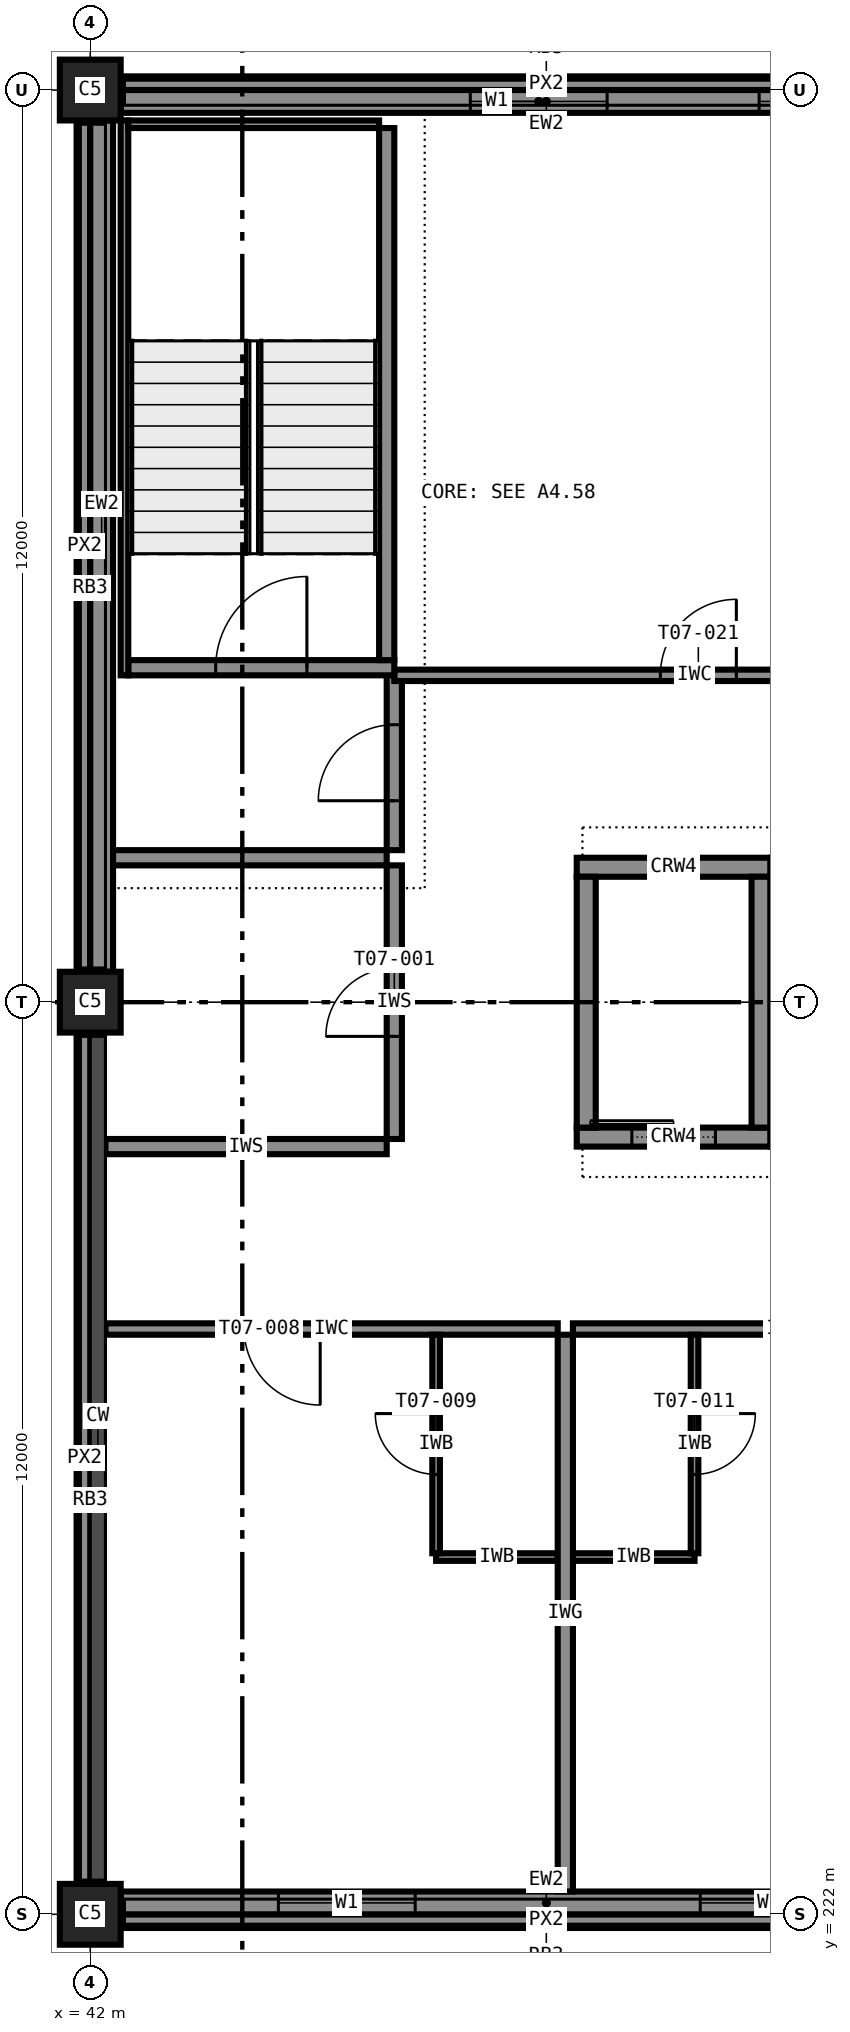
"""IFC4 building model, lengths in metres.
Left out: names, types, materials, properties, quantities, classifications, styles, units other than length and angle.
Written with IfcOpenShell. Run it as: python <this file> out.ifc"""

import sys

from ifc_helpers import new_model, si_unit, direction, frame, frame_2d, origin, origin_2d, place, context, subcontext, project, spatial, rectangle, extrude, element, fill, save


model = new_model("IFC4")
c1 = context("Model", 3, precision=1e-05, world=origin(), true_north=direction((0.0, 1.0)))
c2 = subcontext(c1, "Body", "Model", "MODEL_VIEW")
j1 = project(units=[si_unit("LENGTHUNIT", "METRE"), si_unit("PLANEANGLEUNIT", "RADIAN")], contexts=[c1])
p1 = place(None, origin())
s1 = spatial("IfcSite", under=j1, at=p1, CompositionType="ELEMENT")
p2 = place(p1, origin())
s2 = spatial("IfcBuilding", under=s1, at=p2, CompositionType="ELEMENT")
p3 = place(p2, frame((0.0, 0.0, 35.4)))
s3 = spatial("IfcBuildingStorey", under=s2, at=p3, CompositionType="ELEMENT", Elevation=35.4)
for number, where, z_axis, x_axis in (
    (1, (42.0, 222.0, 0.0), (0.0, 0.0, 1.0), (1.0, 0.0, 0.0)),
    (2, (42.0, 234.0, 0.0), (0.0, 0.0, 1.0), (1.0, 0.0, 0.0)),
    (3, (42.0, 246.0, 0.0), (0.0, 0.0, 1.0), (1.0, 0.0, 0.0)),
):
    element("IfcColumn", number, at=place(p3, frame(where, z_axis=z_axis, x_axis=x_axis)), inside=s3, PredefinedType="COLUMN", context=c2, shape_type="SweptSolid", body=[
        extrude(rectangle(XDim=0.8, YDim=0.8, at=origin_2d()), origin(), (0.0, 0.0, 1.0), 3.6),
    ])
p4 = place(p3, frame((48.4, 232.225, 0.0), z_axis=(0.0, 0.0, 1.0), x_axis=(1.0, 0.0, 0.0)))
e4 = element("IfcWall", 4, at=p4, inside=s3, PredefinedType="SHEAR", context=c2, shape_type="SweptSolid", body=[
    extrude(rectangle(XDim=2.55, YDim=0.25, at=frame_2d((1.275, 0.0))), origin(), (0.0, 0.0, 1.0), 3.6),
])
p5 = place(p4, frame((0.725, 0.0, 0.0)))
e5 = element("IfcOpeningElement", 5, at=p5, cuts=e4, PredefinedType="OPENING", context=c2, shape_type="SweptSolid", body=[
    extrude(rectangle(XDim=1.1, YDim=2.1, at=frame_2d((0.55, 1.05))), frame((0.0, 0.135, 0.0), z_axis=(0.0, -1.0, 0.0), x_axis=(1.0, 0.0, 0.0)), (0.0, 0.0, 1.0), 0.27),
])
p6 = place(p3, frame((48.4, 235.775, 0.0), z_axis=(0.0, 0.0, 1.0), x_axis=(1.0, 0.0, 0.0)))
e6 = element("IfcWall", 6, at=p6, inside=s3, PredefinedType="SHEAR", context=c2, shape_type="SweptSolid", body=[
    extrude(rectangle(XDim=2.55, YDim=0.25, at=frame_2d((1.275, 0.0))), origin(), (0.0, 0.0, 1.0), 3.6),
])
for number, where, z_axis, x_axis in (
    (7, (48.525, 232.35, 0.0), (0.0, 0.0, 1.0), (0.0, 1.0, 0.0)),
    (8, (50.825, 232.35, 0.0), (0.0, 0.0, 1.0), (0.0, 1.0, 0.0)),
):
    element("IfcWall", number, at=place(p3, frame(where, z_axis=z_axis, x_axis=x_axis)), inside=s3, PredefinedType="SHEAR", context=c2, shape_type="SweptSolid", body=[
        extrude(rectangle(XDim=3.3, YDim=0.25, at=frame_2d((1.65, 0.0))), origin(), (0.0, 0.0, 1.0), 3.6),
    ])
p7 = place(p3, frame((50.95, 232.225, 0.0), z_axis=(0.0, 0.0, 1.0), x_axis=(1.0, 0.0, 0.0)))
e9 = element("IfcWall", 9, at=p7, inside=s3, PredefinedType="SHEAR", context=c2, shape_type="SweptSolid", body=[
    extrude(rectangle(XDim=2.55, YDim=0.25, at=frame_2d((1.275, 0.0))), origin(), (0.0, 0.0, 1.0), 3.6),
])
p8 = place(p7, frame((0.725, 0.0, 0.0)))
e10 = element("IfcOpeningElement", 10, at=p8, cuts=e9, PredefinedType="OPENING", context=c2, shape_type="SweptSolid", body=[
    extrude(rectangle(XDim=1.1, YDim=2.1, at=frame_2d((0.55, 1.05))), frame((0.0, 0.135, 0.0), z_axis=(0.0, -1.0, 0.0), x_axis=(1.0, 0.0, 0.0)), (0.0, 0.0, 1.0), 0.27),
])
p9 = place(p3, frame((50.95, 235.775, 0.0), z_axis=(0.0, 0.0, 1.0), x_axis=(1.0, 0.0, 0.0)))
e11 = element("IfcWall", 11, at=p9, inside=s3, PredefinedType="SHEAR", context=c2, shape_type="SweptSolid", body=[
    extrude(rectangle(XDim=2.55, YDim=0.25, at=frame_2d((1.275, 0.0))), origin(), (0.0, 0.0, 1.0), 3.6),
])
p10 = place(p3, frame((42.5, 238.4, 0.0), z_axis=(0.0, 0.0, 1.0), x_axis=(1.0, 0.0, 0.0)))
e12 = element("IfcWall", 12, at=p10, inside=s3, PredefinedType="SHEAR", context=c2, shape_type="SweptSolid", body=[
    extrude(rectangle(XDim=3.5, YDim=0.2, at=frame_2d((1.75, 0.0))), origin(), (0.0, 0.0, 1.0), 3.6),
])
p11 = place(p10, frame((1.15, 0.0, 0.0)))
e13 = element("IfcOpeningElement", 13, at=p11, cuts=e12, PredefinedType="OPENING", context=c2, shape_type="SweptSolid", body=[
    extrude(rectangle(XDim=1.2, YDim=2.1, at=frame_2d((0.6, 1.05))), frame((0.0, 0.11, 0.0), z_axis=(0.0, -1.0, 0.0), x_axis=(1.0, 0.0, 0.0)), (0.0, 0.0, 1.0), 0.22),
])
p12 = place(p3, frame((45.9, 238.5, 0.0), z_axis=(0.0, 0.0, 1.0), x_axis=(0.0, 1.0, 0.0)))
e14 = element("IfcWall", 14, at=p12, inside=s3, PredefinedType="SHEAR", context=c2, shape_type="SweptSolid", body=[
    extrude(rectangle(XDim=7.0, YDim=0.2, at=frame_2d((3.5, 0.0))), origin(), (0.0, 0.0, 1.0), 3.6),
])
p13 = place(p3, frame((42.45, 238.3, 0.0), z_axis=(0.0, 0.0, 1.0), x_axis=(0.0, 1.0, 0.0)))
e15 = element("IfcWall", 15, at=p13, inside=s3, PredefinedType="SHEAR", context=c2, shape_type="SweptSolid", body=[
    extrude(rectangle(XDim=7.3, YDim=0.1, at=frame_2d((3.65, 0.0))), origin(), (0.0, 0.0, 1.0), 3.4),
])
p14 = place(p3, frame((42.5, 245.55, 0.0), z_axis=(0.0, 0.0, 1.0), x_axis=(1.0, 0.0, 0.0)))
e16 = element("IfcWall", 16, at=p14, inside=s3, PredefinedType="SHEAR", context=c2, shape_type="SweptSolid", body=[
    extrude(rectangle(XDim=3.3, YDim=0.1, at=frame_2d((1.65, 0.0))), origin(), (0.0, 0.0, 1.0), 3.4),
])
p15 = place(p3, frame((42.4, 222.15, 0.0), z_axis=(0.0, 0.0, 1.0), x_axis=(1.0, 0.0, 0.0)))
e17 = element("IfcWall", 17, at=p15, inside=s3, PredefinedType="STANDARD", context=c2, shape_type="SweptSolid", body=[
    extrude(rectangle(XDim=11.2, YDim=0.3, at=frame_2d((5.6, 0.0))), origin(), (0.0, 0.0, 1.0), 2.6),
])
p16 = place(p15, frame((2.075, 0.0, 0.85)))
e18 = element("IfcOpeningElement", 18, at=p16, cuts=e17, PredefinedType="OPENING", context=c2, shape_type="SweptSolid", body=[
    extrude(rectangle(XDim=1.8, YDim=1.75, at=frame_2d((0.9, 0.875))), frame((0.0, 0.16, 0.0), z_axis=(0.0, -1.0, 0.0), x_axis=(1.0, 0.0, 0.0)), (0.0, 0.0, 1.0), 0.32),
])
p17 = place(p15, frame((7.625, 0.0, 0.85)))
e19 = element("IfcOpeningElement", 19, at=p17, cuts=e17, PredefinedType="OPENING", context=c2, shape_type="SweptSolid", body=[
    extrude(rectangle(XDim=1.8, YDim=1.75, at=frame_2d((0.9, 0.875))), frame((0.0, 0.16, 0.0), z_axis=(0.0, -1.0, 0.0), x_axis=(1.0, 0.0, 0.0)), (0.0, 0.0, 1.0), 0.32),
])
p18 = place(p3, frame((42.4, 221.925, 3.4), z_axis=(0.0, 0.0, 1.0), x_axis=(1.0, 0.0, 0.0)))
e20 = element("IfcWall", 20, at=p18, inside=s3, PredefinedType="STANDARD", context=c2, shape_type="SweptSolid", body=[
    extrude(rectangle(XDim=11.2, YDim=0.15, at=frame_2d((5.6, 0.0))), origin(), (0.0, 0.0, 1.0), 0.2),
])
p19 = place(p3, frame((53.6, 245.85, 0.0), z_axis=(0.0, 0.0, 1.0), x_axis=(-1.0, 0.0, 0.0)))
e21 = element("IfcWall", 21, at=p19, inside=s3, PredefinedType="STANDARD", context=c2, shape_type="SweptSolid", body=[
    extrude(rectangle(XDim=11.2, YDim=0.3, at=frame_2d((5.6, 0.0))), origin(), (0.0, 0.0, 1.0), 2.6),
])
p20 = place(p19, frame((1.0, 0.0, 0.85)))
e22 = element("IfcOpeningElement", 22, at=p20, cuts=e21, PredefinedType="OPENING", context=c2, shape_type="SweptSolid", body=[
    extrude(rectangle(XDim=1.8, YDim=1.75, at=frame_2d((0.9, 0.875))), frame((0.0, 0.16, 0.0), z_axis=(0.0, -1.0, 0.0), x_axis=(1.0, 0.0, 0.0)), (0.0, 0.0, 1.0), 0.32),
])
p21 = place(p19, frame((4.8, 0.0, 0.85)))
e23 = element("IfcOpeningElement", 23, at=p21, cuts=e21, PredefinedType="OPENING", context=c2, shape_type="SweptSolid", body=[
    extrude(rectangle(XDim=1.8, YDim=1.75, at=frame_2d((0.9, 0.875))), frame((0.0, 0.16, 0.0), z_axis=(0.0, -1.0, 0.0), x_axis=(1.0, 0.0, 0.0)), (0.0, 0.0, 1.0), 0.32),
])
p22 = place(p3, frame((53.6, 246.075, 3.4), z_axis=(0.0, 0.0, 1.0), x_axis=(-1.0, 0.0, 0.0)))
e24 = element("IfcWall", 24, at=p22, inside=s3, PredefinedType="STANDARD", context=c2, shape_type="SweptSolid", body=[
    extrude(rectangle(XDim=11.2, YDim=0.15, at=frame_2d((5.6, 0.0))), origin(), (0.0, 0.0, 1.0), 0.2),
])
p23 = place(p3, frame((42.15, 245.6, 0.0), z_axis=(0.0, 0.0, 1.0), x_axis=(0.0, -1.0, 0.0)))
e25 = element("IfcWall", 25, at=p23, inside=s3, PredefinedType="STANDARD", context=c2, shape_type="SweptSolid", body=[
    extrude(rectangle(XDim=11.2, YDim=0.3, at=frame_2d((5.6, 0.0))), origin(), (0.0, 0.0, 1.0), 2.6),
])
for number, where, z_axis, x_axis in (
    (26, (41.925, 245.6, 3.4), (0.0, 0.0, 1.0), (0.0, -1.0, 0.0)),
    (27, (41.925, 233.6, 3.4), (0.0, 0.0, 1.0), (0.0, -1.0, 0.0)),
):
    element("IfcWall", number, at=place(p3, frame(where, z_axis=z_axis, x_axis=x_axis)), inside=s3, PredefinedType="STANDARD", context=c2, shape_type="SweptSolid", body=[
        extrude(rectangle(XDim=11.2, YDim=0.15, at=frame_2d((5.6, 0.0))), origin(), (0.0, 0.0, 1.0), 0.2),
    ])
p24 = place(p3, frame((42.2, 232.1, 0.0), z_axis=(0.0, 0.0, 1.0), x_axis=(1.0, 0.0, 0.0)))
e28 = element("IfcWall", 28, at=p24, inside=s3, PredefinedType="PARTITIONING", context=c2, shape_type="SweptSolid", body=[
    extrude(rectangle(XDim=3.7, YDim=0.2, at=frame_2d((1.85, 0.0))), origin(), (0.0, 0.0, 1.0), 3.4),
])
p25 = place(p3, frame((42.3, 235.9, 0.0), z_axis=(0.0, 0.0, 1.0), x_axis=(1.0, 0.0, 0.0)))
e29 = element("IfcWall", 29, at=p25, inside=s3, PredefinedType="PARTITIONING", context=c2, shape_type="SweptSolid", body=[
    extrude(rectangle(XDim=3.6, YDim=0.2, at=frame_2d((1.8, 0.0))), origin(), (0.0, 0.0, 1.0), 3.4),
])
p26 = place(p3, frame((46.0, 232.2, 0.0), z_axis=(0.0, 0.0, 1.0), x_axis=(0.0, 1.0, 0.0)))
e30 = element("IfcWall", 30, at=p26, inside=s3, PredefinedType="PARTITIONING", context=c2, shape_type="SweptSolid", body=[
    extrude(rectangle(XDim=3.6, YDim=0.2, at=frame_2d((1.8, 0.0))), origin(), (0.0, 0.0, 1.0), 3.4),
])
p27 = place(p26, frame((1.35, 0.0, 0.0)))
e31 = element("IfcOpeningElement", 31, at=p27, cuts=e30, PredefinedType="OPENING", context=c2, shape_type="SweptSolid", body=[
    extrude(rectangle(XDim=0.9, YDim=2.1, at=frame_2d((0.45, 1.05))), frame((0.0, 0.11, 0.0), z_axis=(0.0, -1.0, 0.0), x_axis=(1.0, 0.0, 0.0)), (0.0, 0.0, 1.0), 0.22),
])
p28 = place(p3, frame((46.0, 236.0, 0.0), z_axis=(0.0, 0.0, 1.0), x_axis=(0.0, 1.0, 0.0)))
e32 = element("IfcWall", 32, at=p28, inside=s3, PredefinedType="PARTITIONING", context=c2, shape_type="SweptSolid", body=[
    extrude(rectangle(XDim=2.3, YDim=0.2, at=frame_2d((1.15, 0.0))), origin(), (0.0, 0.0, 1.0), 3.4),
])
p29 = place(p28, frame((0.65, 0.0, 0.0)))
e33 = element("IfcOpeningElement", 33, at=p29, cuts=e32, PredefinedType="OPENING", context=c2, shape_type="SweptSolid", body=[
    extrude(rectangle(XDim=1.0, YDim=2.1, at=frame_2d((0.5, 1.05))), frame((0.0, 0.11, 0.0), z_axis=(0.0, -1.0, 0.0), x_axis=(1.0, 0.0, 0.0)), (0.0, 0.0, 1.0), 0.22),
])
p30 = place(p3, frame((48.15, 229.7, 0.0), z_axis=(0.0, 0.0, 1.0), x_axis=(-1.0, 0.0, 0.0)))
e34 = element("IfcWall", 34, at=p30, inside=s3, PredefinedType="PARTITIONING", context=c2, shape_type="SweptSolid", body=[
    extrude(rectangle(XDim=5.95, YDim=0.15, at=frame_2d((2.975, 0.0))), origin(), (0.0, 0.0, 1.0), 3.4),
])
p31 = place(p30, frame((3.125, 0.0, 0.0)))
e35 = element("IfcOpeningElement", 35, at=p31, cuts=e34, PredefinedType="OPENING", context=c2, shape_type="SweptSolid", body=[
    extrude(rectangle(XDim=1.0, YDim=2.1, at=frame_2d((0.5, 1.05))), frame((0.0, 0.085, 0.0), z_axis=(0.0, -1.0, 0.0), x_axis=(1.0, 0.0, 0.0)), (0.0, 0.0, 1.0), 0.17),
])
p32 = place(p3, frame((46.55, 226.7, 0.0), z_axis=(0.0, 0.0, 1.0), x_axis=(1.0, 0.0, 0.0)))
e36 = element("IfcWall", 36, at=p32, inside=s3, PredefinedType="PARTITIONING", context=c2, shape_type="SweptSolid", body=[
    extrude(rectangle(XDim=1.6, YDim=0.1, at=frame_2d((0.8, 0.0))), origin(), (0.0, 0.0, 1.0), 3.4),
])
p33 = place(p3, frame((46.55, 226.75, 0.0), z_axis=(0.0, 0.0, 1.0), x_axis=(0.0, 1.0, 0.0)))
e37 = element("IfcWall", 37, at=p33, inside=s3, PredefinedType="PARTITIONING", context=c2, shape_type="SweptSolid", body=[
    extrude(rectangle(XDim=2.875, YDim=0.1, at=frame_2d((1.438, 0.0))), origin(), (0.0, 0.0, 1.0), 3.4),
])
p34 = place(p33, frame((1.038, 0.0, 0.0)))
e38 = element("IfcOpeningElement", 38, at=p34, cuts=e37, PredefinedType="OPENING", context=c2, shape_type="SweptSolid", body=[
    extrude(rectangle(XDim=0.8, YDim=2.1, at=frame_2d((0.4, 1.05))), frame((0.0, 0.06, 0.0), z_axis=(0.0, -1.0, 0.0), x_axis=(1.0, 0.0, 0.0)), (0.0, 0.0, 1.0), 0.12),
])
p35 = place(p3, frame((53.9, 229.7, 0.0), z_axis=(0.0, 0.0, 1.0), x_axis=(-1.0, 0.0, 0.0)))
e39 = element("IfcWall", 39, at=p35, inside=s3, PredefinedType="PARTITIONING", context=c2, shape_type="SweptSolid", body=[
    extrude(rectangle(XDim=5.55, YDim=0.15, at=frame_2d((2.775, 0.0))), origin(), (0.0, 0.0, 1.0), 3.4),
])
p36 = place(p35, frame((1.425, 0.0, 0.0)))
e40 = element("IfcOpeningElement", 40, at=p36, cuts=e39, PredefinedType="OPENING", context=c2, shape_type="SweptSolid", body=[
    extrude(rectangle(XDim=1.0, YDim=2.1, at=frame_2d((0.5, 1.05))), frame((0.0, 0.085, 0.0), z_axis=(0.0, -1.0, 0.0), x_axis=(1.0, 0.0, 0.0)), (0.0, 0.0, 1.0), 0.17),
])
p37 = place(p3, frame((48.35, 226.7, 0.0), z_axis=(0.0, 0.0, 1.0), x_axis=(1.0, 0.0, 0.0)))
e41 = element("IfcWall", 41, at=p37, inside=s3, PredefinedType="PARTITIONING", context=c2, shape_type="SweptSolid", body=[
    extrude(rectangle(XDim=1.6, YDim=0.1, at=frame_2d((0.8, 0.0))), origin(), (0.0, 0.0, 1.0), 3.4),
])
p38 = place(p3, frame((49.95, 229.625, 0.0), z_axis=(0.0, 0.0, 1.0), x_axis=(0.0, -1.0, 0.0)))
e42 = element("IfcWall", 42, at=p38, inside=s3, PredefinedType="PARTITIONING", context=c2, shape_type="SweptSolid", body=[
    extrude(rectangle(XDim=2.875, YDim=0.1, at=frame_2d((1.438, 0.0))), origin(), (0.0, 0.0, 1.0), 3.4),
])
p39 = place(p38, frame((1.038, 0.0, 0.0)))
e43 = element("IfcOpeningElement", 43, at=p39, cuts=e42, PredefinedType="OPENING", context=c2, shape_type="SweptSolid", body=[
    extrude(rectangle(XDim=0.8, YDim=2.1, at=frame_2d((0.4, 1.05))), frame((0.0, 0.06, 0.0), z_axis=(0.0, -1.0, 0.0), x_axis=(1.0, 0.0, 0.0)), (0.0, 0.0, 1.0), 0.12),
])
p40 = place(p3, frame((48.25, 222.3, 0.0), z_axis=(0.0, 0.0, 1.0), x_axis=(0.0, 1.0, 0.0)))
e44 = element("IfcWall", 44, at=p40, inside=s3, PredefinedType="PARTITIONING", context=c2, shape_type="SweptSolid", body=[
    extrude(rectangle(XDim=7.325, YDim=0.2, at=frame_2d((3.663, 0.0))), origin(), (0.0, 0.0, 1.0), 3.4),
])
p41 = place(p3, frame((46.0, 238.3, 0.0), z_axis=(0.0, 0.0, 1.0), x_axis=(1.0, 0.0, 0.0)))
e45 = element("IfcWall", 45, at=p41, inside=s3, PredefinedType="PARTITIONING", context=c2, shape_type="SweptSolid", body=[
    extrude(rectangle(XDim=7.9, YDim=0.15, at=frame_2d((3.95, 0.0))), origin(), (0.0, 0.0, 1.0), 3.4),
])
p42 = place(p41, frame((3.5, 0.0, 0.0)))
e46 = element("IfcOpeningElement", 46, at=p42, cuts=e45, PredefinedType="OPENING", context=c2, shape_type="SweptSolid", body=[
    extrude(rectangle(XDim=1.0, YDim=2.1, at=frame_2d((0.5, 1.05))), frame((0.0, 0.085, 0.0), z_axis=(0.0, -1.0, 0.0), x_axis=(1.0, 0.0, 0.0)), (0.0, 0.0, 1.0), 0.17),
])
p43 = place(p16, origin())
e47 = element("IfcWindow", 47, at=p43, inside=s3, PartitioningType="SINGLE_PANEL", PredefinedType="WINDOW", context=c2, shape_type="SweptSolid", body=[
    extrude(rectangle(XDim=1.8, YDim=1.75, at=frame_2d((0.9, 0.875))), frame((0.0, 0.03, 0.0), z_axis=(0.0, -1.0, 0.0), x_axis=(1.0, 0.0, 0.0)), (0.0, 0.0, 1.0), 0.06),
])
fill(e18, e47)
p44 = place(p17, origin())
e48 = element("IfcWindow", 48, at=p44, inside=s3, PartitioningType="SINGLE_PANEL", PredefinedType="WINDOW", context=c2, shape_type="SweptSolid", body=[
    extrude(rectangle(XDim=1.8, YDim=1.75, at=frame_2d((0.9, 0.875))), frame((0.0, 0.03, 0.0), z_axis=(0.0, -1.0, 0.0), x_axis=(1.0, 0.0, 0.0)), (0.0, 0.0, 1.0), 0.06),
])
fill(e19, e48)
p45 = place(p20, origin())
e49 = element("IfcWindow", 49, at=p45, inside=s3, PartitioningType="SINGLE_PANEL", PredefinedType="WINDOW", context=c2, shape_type="SweptSolid", body=[
    extrude(rectangle(XDim=1.8, YDim=1.75, at=frame_2d((0.9, 0.875))), frame((0.0, 0.03, 0.0), z_axis=(0.0, -1.0, 0.0), x_axis=(1.0, 0.0, 0.0)), (0.0, 0.0, 1.0), 0.06),
])
fill(e22, e49)
p46 = place(p21, origin())
e50 = element("IfcWindow", 50, at=p46, inside=s3, PartitioningType="SINGLE_PANEL", PredefinedType="WINDOW", context=c2, shape_type="SweptSolid", body=[
    extrude(rectangle(XDim=1.8, YDim=1.75, at=frame_2d((0.9, 0.875))), frame((0.0, 0.03, 0.0), z_axis=(0.0, -1.0, 0.0), x_axis=(1.0, 0.0, 0.0)), (0.0, 0.0, 1.0), 0.06),
])
fill(e23, e50)
p47 = place(p27, origin())
e51 = element("IfcDoor", 51, at=p47, inside=s3, OperationType="SINGLE_SWING_LEFT", PredefinedType="DOOR", context=c2, shape_type="SweptSolid", body=[
    extrude(rectangle(XDim=0.9, YDim=2.1, at=frame_2d((0.45, 1.05))), frame((0.0, 0.025, 0.0), z_axis=(0.0, -1.0, 0.0), x_axis=(1.0, 0.0, 0.0)), (0.0, 0.0, 1.0), 0.05),
])
fill(e31, e51)
p48 = place(p29, origin())
e52 = element("IfcDoor", 52, at=p48, inside=s3, OperationType="SINGLE_SWING_LEFT", PredefinedType="DOOR", context=c2, shape_type="SweptSolid", body=[
    extrude(rectangle(XDim=1.0, YDim=2.1, at=frame_2d((0.5, 1.05))), frame((0.0, 0.025, 0.0), z_axis=(0.0, -1.0, 0.0), x_axis=(1.0, 0.0, 0.0)), (0.0, 0.0, 1.0), 0.05),
])
fill(e33, e52)
p49 = place(p31, origin())
e53 = element("IfcDoor", 53, at=p49, inside=s3, OperationType="SINGLE_SWING_LEFT", PredefinedType="DOOR", context=c2, shape_type="SweptSolid", body=[
    extrude(rectangle(XDim=1.0, YDim=2.1, at=frame_2d((0.5, 1.05))), frame((0.0, 0.025, 0.0), z_axis=(0.0, -1.0, 0.0), x_axis=(1.0, 0.0, 0.0)), (0.0, 0.0, 1.0), 0.05),
])
fill(e35, e53)
p50 = place(p34, origin())
e54 = element("IfcDoor", 54, at=p50, inside=s3, OperationType="SINGLE_SWING_RIGHT", PredefinedType="DOOR", context=c2, shape_type="SweptSolid", body=[
    extrude(rectangle(XDim=0.8, YDim=2.1, at=frame_2d((0.4, 1.05))), frame((0.0, 0.025, 0.0), z_axis=(0.0, -1.0, 0.0), x_axis=(1.0, 0.0, 0.0)), (0.0, 0.0, 1.0), 0.05),
])
fill(e38, e54)
p51 = place(p39, origin())
e55 = element("IfcDoor", 55, at=p51, inside=s3, OperationType="SINGLE_SWING_LEFT", PredefinedType="DOOR", context=c2, shape_type="SweptSolid", body=[
    extrude(rectangle(XDim=0.8, YDim=2.1, at=frame_2d((0.4, 1.05))), frame((0.0, 0.025, 0.0), z_axis=(0.0, -1.0, 0.0), x_axis=(1.0, 0.0, 0.0)), (0.0, 0.0, 1.0), 0.05),
])
fill(e43, e55)
p52 = place(p42, origin())
e56 = element("IfcDoor", 56, at=p52, inside=s3, OperationType="SINGLE_SWING_RIGHT", PredefinedType="DOOR", context=c2, shape_type="SweptSolid", body=[
    extrude(rectangle(XDim=1.0, YDim=2.1, at=frame_2d((0.5, 1.05))), frame((0.0, 0.025, 0.0), z_axis=(0.0, -1.0, 0.0), x_axis=(1.0, 0.0, 0.0)), (0.0, 0.0, 1.0), 0.05),
])
fill(e46, e56)
p53 = place(p5, origin())
e57 = element("IfcDoor", 57, at=p53, inside=s3, OperationType="SLIDING_TO_LEFT", PredefinedType="DOOR", context=c2, shape_type="SweptSolid", body=[
    extrude(rectangle(XDim=1.1, YDim=2.1, at=frame_2d((0.55, 1.05))), frame((0.0, 0.025, 0.0), z_axis=(0.0, -1.0, 0.0), x_axis=(1.0, 0.0, 0.0)), (0.0, 0.0, 1.0), 0.05),
])
fill(e5, e57)
p54 = place(p11, origin())
e58 = element("IfcDoor", 58, at=p54, inside=s3, OperationType="SINGLE_SWING_RIGHT", PredefinedType="DOOR", context=c2, shape_type="SweptSolid", body=[
    extrude(rectangle(XDim=1.2, YDim=2.1, at=frame_2d((0.6, 1.05))), frame((0.0, 0.025, 0.0), z_axis=(0.0, -1.0, 0.0), x_axis=(1.0, 0.0, 0.0)), (0.0, 0.0, 1.0), 0.05),
])
fill(e13, e58)
save(model, sys.argv[1])
